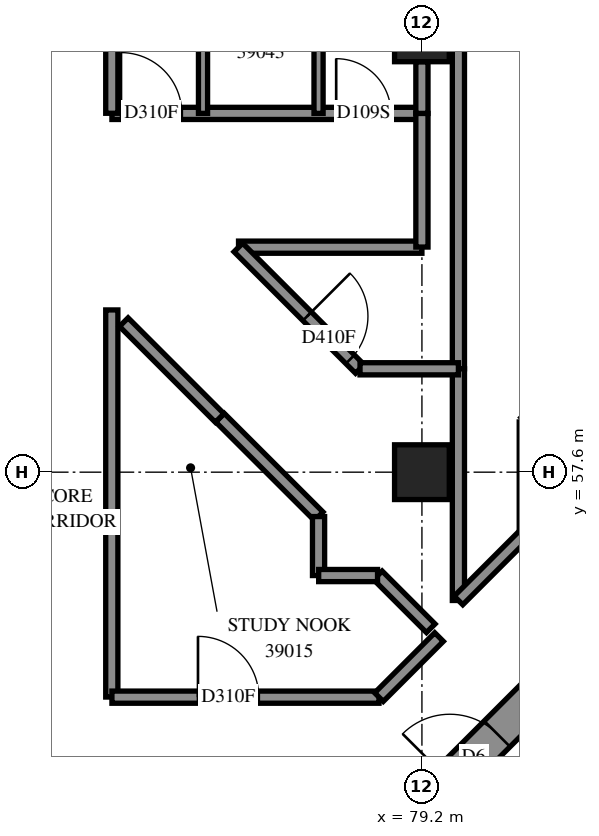
"""IFC4 building model, lengths in metres.
Left out: names, types, materials, properties, quantities, classifications, styles, units other than length and angle.
Written with IfcOpenShell. Run it as: python <this file> out.ifc"""

import sys

from ifc_helpers import new_model, si_unit, direction, frame, frame_2d, origin, origin_2d, place, context, subcontext, project, spatial, rectangle, extrude, element, fill, save


model = new_model("IFC4")
c1 = context("Model", 3, precision=1e-05, world=origin(), true_north=direction((0.0, 1.0)))
c2 = subcontext(c1, "Body", "Model", "MODEL_VIEW")
j1 = project(units=[si_unit("LENGTHUNIT", "METRE"), si_unit("PLANEANGLEUNIT", "RADIAN")], contexts=[c1])
p1 = place(None, origin())
s1 = spatial("IfcSite", under=j1, at=p1, CompositionType="ELEMENT")
p2 = place(p1, origin())
s2 = spatial("IfcBuilding", under=s1, at=p2, CompositionType="ELEMENT")
p3 = place(p2, frame((0.0, 0.0, 145.6)))
s3 = spatial("IfcBuildingStorey", under=s2, at=p3, CompositionType="ELEMENT", Elevation=145.6)
for number, where, z_axis, x_axis in (
    (1, (79.2, 57.6, 0.0), (0.0, 0.0, 1.0), (1.0, 0.0, 0.0)),
    (2, (79.2, 64.8, 0.0), (0.0, 0.0, 1.0), (1.0, 0.0, 0.0)),
):
    element("IfcColumn", number, at=place(p3, frame(where, z_axis=z_axis, x_axis=x_axis)), inside=s3, PredefinedType="COLUMN", context=c2, shape_type="SweptSolid", body=[
        extrude(rectangle(XDim=0.9, YDim=0.9, at=origin_2d()), origin(), (0.0, 0.0, 1.0), 3.1),
    ])
p4 = place(p3, frame((76.442, 49.302, -0.3), z_axis=(0.0, 0.0, 1.0), x_axis=(0.7071067812, 0.7071067812, 0.0)))
e3 = element("IfcWall", 3, at=p4, inside=s3, PredefinedType="SHEAR", context=c2, shape_type="SweptSolid", body=[
    extrude(rectangle(XDim=14.4, YDim=0.6, at=frame_2d((7.2, 0.0))), origin(), (0.0, 0.0, 1.0), 2.7),
])
p5 = place(p4, frame((4.55, 0.0, 0.3)))
e4 = element("IfcOpeningElement", 4, at=p5, cuts=e3, PredefinedType="OPENING", context=c2, shape_type="SweptSolid", body=[
    extrude(rectangle(XDim=1.1, YDim=2.1, at=frame_2d((0.55, 1.05))), frame((0.0, 0.31, 0.0), z_axis=(0.0, -1.0, 0.0), x_axis=(1.0, 0.0, 0.0)), (0.0, 0.0, 1.0), 0.62),
])
p6 = place(p4, frame((11.35, 0.0, 0.3)))
e5 = element("IfcOpeningElement", 5, at=p6, cuts=e3, PredefinedType="OPENING", context=c2, shape_type="SweptSolid", body=[
    extrude(rectangle(XDim=1.1, YDim=2.1, at=frame_2d((0.55, 1.05))), frame((0.0, 0.31, 0.0), z_axis=(0.0, -1.0, 0.0), x_axis=(1.0, 0.0, 0.0)), (0.0, 0.0, 1.0), 0.62),
])
p7 = place(p3, frame((79.8, 59.3, 0.0), z_axis=(0.0, 0.0, 1.0), x_axis=(0.0, 1.0, 0.0)))
e6 = element("IfcWall", 6, at=p7, inside=s3, PredefinedType="PARTITIONING", context=c2, shape_type="SweptSolid", body=[
    extrude(rectangle(XDim=14.294, YDim=0.2, at=frame_2d((7.147, 0.0))), origin(), (0.0, 0.0, 1.0), 3.1),
])
p8 = place(p3, frame((74.1, 53.902, 0.0), z_axis=(0.0, 0.0, 1.0), x_axis=(0.0, 1.0, 0.0)))
e7 = element("IfcWall", 7, at=p8, inside=s3, PredefinedType="PARTITIONING", context=c2, shape_type="SweptSolid", body=[
    extrude(rectangle(XDim=6.366, YDim=0.2, at=frame_2d((3.183, 0.0))), origin(), (0.0, 0.0, 1.0), 3.1),
])
p9 = place(p3, frame((74.102, 63.5, 0.0), z_axis=(0.0, 0.0, 1.0), x_axis=(1.0, 0.0, 0.0)))
e8 = element("IfcWall", 8, at=p9, inside=s3, PredefinedType="PARTITIONING", context=c2, shape_type="SweptSolid", body=[
    extrude(rectangle(XDim=5.098, YDim=0.2, at=frame_2d((2.549, 0.0))), origin(), (0.0, 0.0, 1.0), 3.1),
])
p10 = place(p9, frame((0.149, 0.0, 0.0)))
e9 = element("IfcOpeningElement", 9, at=p10, cuts=e8, PredefinedType="OPENING", context=c2, shape_type="SweptSolid", body=[
    extrude(rectangle(XDim=1.0, YDim=2.1, at=frame_2d((0.5, 1.05))), frame((0.0, 0.11, 0.0), z_axis=(0.0, -1.0, 0.0), x_axis=(1.0, 0.0, 0.0)), (0.0, 0.0, 1.0), 0.22),
])
p11 = place(p9, frame((3.688, 0.0, 0.0)))
e10 = element("IfcOpeningElement", 10, at=p11, cuts=e8, PredefinedType="OPENING", context=c2, shape_type="SweptSolid", body=[
    extrude(rectangle(XDim=0.9, YDim=2.1, at=frame_2d((0.45, 1.05))), frame((0.0, 0.11, 0.0), z_axis=(0.0, -1.0, 0.0), x_axis=(1.0, 0.0, 0.0)), (0.0, 0.0, 1.0), 0.22),
])
p12 = place(p3, frame((74.102, 53.9, 0.0), z_axis=(0.0, 0.0, 1.0), x_axis=(1.0, 0.0, 0.0)))
e11 = element("IfcWall", 11, at=p12, inside=s3, PredefinedType="PARTITIONING", context=c2, shape_type="SweptSolid", body=[
    extrude(rectangle(XDim=4.392, YDim=0.2, at=frame_2d((2.196, 0.0))), origin(), (0.0, 0.0, 1.0), 3.1),
])
p13 = place(p12, frame((1.415, 0.0, 0.0)))
e12 = element("IfcOpeningElement", 12, at=p13, cuts=e11, PredefinedType="OPENING", context=c2, shape_type="SweptSolid", body=[
    extrude(rectangle(XDim=1.0, YDim=2.1, at=frame_2d((0.5, 1.05))), frame((0.0, 0.11, 0.0), z_axis=(0.0, -1.0, 0.0), x_axis=(1.0, 0.0, 0.0)), (0.0, 0.0, 1.0), 0.22),
])
p14 = place(p3, frame((79.8, 55.49, 0.0), z_axis=(0.0, 0.0, 1.0), x_axis=(0.0, 1.0, 0.0)))
e13 = element("IfcWall", 13, at=p14, inside=s3, PredefinedType="PARTITIONING", context=c2, shape_type="SweptSolid", body=[
    extrude(rectangle(XDim=3.81, YDim=0.2, at=frame_2d((1.905, 0.0))), origin(), (0.0, 0.0, 1.0), 3.1),
])
p15 = place(p3, frame((74.1, 63.502, 0.0), z_axis=(0.0, 0.0, 1.0), x_axis=(0.0, 1.0, 0.0)))
e14 = element("IfcWall", 14, at=p15, inside=s3, PredefinedType="PARTITIONING", context=c2, shape_type="SweptSolid", body=[
    extrude(rectangle(XDim=3.398, YDim=0.2, at=frame_2d((1.699, 0.0))), origin(), (0.0, 0.0, 1.0), 3.1),
])
p16 = place(p3, frame((76.184, 61.3, 0.0), z_axis=(0.0, 0.0, 1.0), x_axis=(1.0, 0.0, 0.0)))
e15 = element("IfcWall", 15, at=p16, inside=s3, PredefinedType="PARTITIONING", context=c2, shape_type="SweptSolid", body=[
    extrude(rectangle(XDim=3.016, YDim=0.2, at=frame_2d((1.508, 0.0))), origin(), (0.0, 0.0, 1.0), 3.1),
])
p17 = place(p3, frame((76.181, 61.295, 0.0), z_axis=(0.0, 0.0, 1.0), x_axis=(0.7071067812, -0.7071067812, 0.0)))
e16 = element("IfcWall", 16, at=p17, inside=s3, PredefinedType="PARTITIONING", context=c2, shape_type="SweptSolid", body=[
    extrude(rectangle(XDim=2.826, YDim=0.2, at=frame_2d((1.413, 0.0))), origin(), (0.0, 0.0, 1.0), 3.1),
])
p18 = place(p17, frame((1.6, 0.0, 0.0)))
e17 = element("IfcOpeningElement", 17, at=p18, cuts=e16, PredefinedType="OPENING", context=c2, shape_type="SweptSolid", body=[
    extrude(rectangle(XDim=1.0, YDim=2.1, at=frame_2d((0.5, 1.05))), frame((0.0, 0.11, 0.0), z_axis=(0.0, -1.0, 0.0), x_axis=(1.0, 0.0, 0.0)), (0.0, 0.0, 1.0), 0.22),
])
for number, where, z_axis, x_axis in (
    (18, (75.6, 63.5, 0.0), (0.0, 0.0, 1.0), (0.0, 1.0, 0.0)),
    (19, (77.5, 63.5, 0.0), (0.0, 0.0, 1.0), (0.0, 1.0, 0.0)),
):
    element("IfcWall", number, at=place(p3, frame(where, z_axis=z_axis, x_axis=x_axis)), inside=s3, PredefinedType="PARTITIONING", context=c2, shape_type="SweptSolid", body=[
        extrude(rectangle(XDim=2.4, YDim=0.15, at=frame_2d((1.2, 0.0))), origin(), (0.0, 0.0, 1.0), 3.1),
    ])
p19 = place(p3, frame((75.879, 58.497, 0.0), z_axis=(0.0, 0.0, 1.0), x_axis=(0.7075423257, -0.7066709682, 0.0)))
e20 = element("IfcWall", 20, at=p19, inside=s3, PredefinedType="PARTITIONING", context=c2, shape_type="SweptSolid", body=[
    extrude(rectangle(XDim=2.295, YDim=0.2, at=frame_2d((1.148, 0.0))), origin(), (0.0, 0.0, 1.0), 3.1),
])
p20 = place(p3, frame((74.297, 60.067, 0.0), z_axis=(0.0, 0.0, 1.0), x_axis=(0.7071067812, -0.7071067812, 0.0)))
e21 = element("IfcWall", 21, at=p20, inside=s3, PredefinedType="PARTITIONING", context=c2, shape_type="SweptSolid", body=[
    extrude(rectangle(XDim=2.229, YDim=0.2, at=frame_2d((1.114, 0.0))), origin(), (0.0, 0.0, 1.0), 3.1),
])
p21 = place(p3, frame((79.2, 61.302, 0.0), z_axis=(0.0, 0.0, 1.0), x_axis=(0.0, 1.0, 0.0)))
e22 = element("IfcWall", 22, at=p21, inside=s3, PredefinedType="PARTITIONING", context=c2, shape_type="SweptSolid", body=[
    extrude(rectangle(XDim=2.198, YDim=0.2, at=frame_2d((1.099, 0.0))), origin(), (0.0, 0.0, 1.0), 3.1),
])
p22 = place(p3, frame((78.182, 59.3, 0.0), z_axis=(0.0, 0.0, 1.0), x_axis=(1.0, 0.0, 0.0)))
e23 = element("IfcWall", 23, at=p22, inside=s3, PredefinedType="PARTITIONING", context=c2, shape_type="SweptSolid", body=[
    extrude(rectangle(XDim=1.618, YDim=0.2, at=frame_2d((0.809, 0.0))), origin(), (0.0, 0.0, 1.0), 3.1),
])
p23 = place(p3, frame((79.801, 55.491, 0.0), z_axis=(0.0, 0.0, 1.0), x_axis=(0.7071067812, 0.7071067812, 0.0)))
e24 = element("IfcWall", 24, at=p23, inside=s3, PredefinedType="PARTITIONING", context=c2, shape_type="SweptSolid", body=[
    extrude(rectangle(XDim=1.553, YDim=0.2, at=frame_2d((0.776, 0.0))), origin(), (0.0, 0.0, 1.0), 3.1),
])
p24 = place(p3, frame((78.494, 53.9, 0.0), z_axis=(0.0, 0.0, 1.0), x_axis=(0.7071067812, 0.7071067812, 0.0)))
e25 = element("IfcWall", 25, at=p24, inside=s3, PredefinedType="PARTITIONING", context=c2, shape_type="SweptSolid", body=[
    extrude(rectangle(XDim=1.397, YDim=0.2, at=frame_2d((0.699, 0.0))), origin(), (0.0, 0.0, 1.0), 3.1),
])
p25 = place(p3, frame((78.475, 55.903, 0.0), z_axis=(0.0, 0.0, 1.0), x_axis=(0.7071067812, -0.7071067812, 0.0)))
e26 = element("IfcWall", 26, at=p25, inside=s3, PredefinedType="PARTITIONING", context=c2, shape_type="SweptSolid", body=[
    extrude(rectangle(XDim=1.23, YDim=0.2, at=frame_2d((0.615, 0.0))), origin(), (0.0, 0.0, 1.0), 3.1),
])
p26 = place(p3, frame((77.5, 55.9, 0.0), z_axis=(0.0, 0.0, 1.0), x_axis=(0.0, 1.0, 0.0)))
e27 = element("IfcWall", 27, at=p26, inside=s3, PredefinedType="PARTITIONING", context=c2, shape_type="SweptSolid", body=[
    extrude(rectangle(XDim=0.97, YDim=0.2, at=frame_2d((0.485, 0.0))), origin(), (0.0, 0.0, 1.0), 3.1),
])
p27 = place(p3, frame((77.502, 55.9, 0.0), z_axis=(0.0, 0.0, 1.0), x_axis=(1.0, 0.0, 0.0)))
e28 = element("IfcWall", 28, at=p27, inside=s3, PredefinedType="PARTITIONING", context=c2, shape_type="SweptSolid", body=[
    extrude(rectangle(XDim=0.968, YDim=0.2, at=frame_2d((0.484, 0.0))), origin(), (0.0, 0.0, 1.0), 3.1),
])
p28 = place(p3, frame((79.2, 63.5, 0.0), z_axis=(0.0, 0.0, 1.0), x_axis=(0.0, 1.0, 0.0)))
e29 = element("IfcWall", 29, at=p28, inside=s3, PredefinedType="PARTITIONING", context=c2, shape_type="SweptSolid", body=[
    extrude(rectangle(XDim=0.85, YDim=0.2, at=frame_2d((0.425, 0.0))), origin(), (0.0, 0.0, 1.0), 3.1),
])
p29 = place(p5, origin())
e30 = element("IfcDoor", 30, at=p29, inside=s3, OperationType="DOUBLE_DOOR_SINGLE_SWING", PredefinedType="DOOR", context=c2, shape_type="SweptSolid", body=[
    extrude(rectangle(XDim=1.1, YDim=2.1, at=frame_2d((0.55, 1.05))), frame((0.0, 0.025, 0.0), z_axis=(0.0, -1.0, 0.0), x_axis=(1.0, 0.0, 0.0)), (0.0, 0.0, 1.0), 0.05),
])
fill(e4, e30)
p30 = place(p13, origin())
e31 = element("IfcDoor", 31, at=p30, inside=s3, OperationType="SINGLE_SWING_LEFT", PredefinedType="DOOR", context=c2, shape_type="SweptSolid", body=[
    extrude(rectangle(XDim=1.0, YDim=2.1, at=frame_2d((0.5, 1.05))), frame((0.0, 0.025, 0.0), z_axis=(0.0, -1.0, 0.0), x_axis=(1.0, 0.0, 0.0)), (0.0, 0.0, 1.0), 0.05),
])
fill(e12, e31)
p31 = place(p10, origin())
e32 = element("IfcDoor", 32, at=p31, inside=s3, OperationType="SINGLE_SWING_RIGHT", PredefinedType="DOOR", context=c2, shape_type="SweptSolid", body=[
    extrude(rectangle(XDim=1.0, YDim=2.1, at=frame_2d((0.5, 1.05))), frame((0.0, 0.025, 0.0), z_axis=(0.0, -1.0, 0.0), x_axis=(1.0, 0.0, 0.0)), (0.0, 0.0, 1.0), 0.05),
])
fill(e9, e32)
p32 = place(p11, origin())
e33 = element("IfcDoor", 33, at=p32, inside=s3, OperationType="SINGLE_SWING_LEFT", PredefinedType="DOOR", context=c2, shape_type="SweptSolid", body=[
    extrude(rectangle(XDim=0.9, YDim=2.1, at=frame_2d((0.45, 1.05))), frame((0.0, 0.025, 0.0), z_axis=(0.0, -1.0, 0.0), x_axis=(1.0, 0.0, 0.0)), (0.0, 0.0, 1.0), 0.05),
])
fill(e10, e33)
p33 = place(p18, origin())
e34 = element("IfcDoor", 34, at=p33, inside=s3, OperationType="SINGLE_SWING_LEFT", PredefinedType="DOOR", context=c2, shape_type="SweptSolid", body=[
    extrude(rectangle(XDim=1.0, YDim=2.1, at=frame_2d((0.5, 1.05))), frame((0.0, 0.025, 0.0), z_axis=(0.0, -1.0, 0.0), x_axis=(1.0, 0.0, 0.0)), (0.0, 0.0, 1.0), 0.05),
])
fill(e17, e34)
save(model, sys.argv[1])
